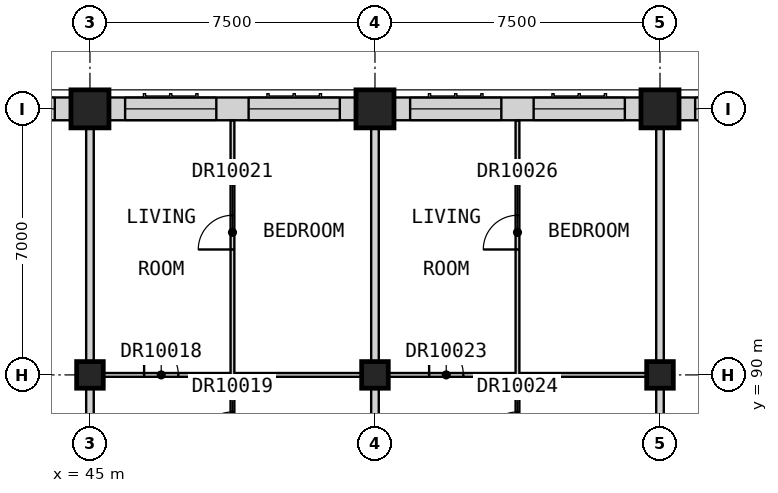
"""IFC4 building model, lengths in metres.
Left out: names, types, materials, properties, quantities, classifications, styles, units other than length and angle.
Written with IfcOpenShell. Run it as: python <this file> out.ifc"""

import sys

from ifc_helpers import new_model, si_unit, direction, frame, frame_2d, origin, origin_2d, place, context, subcontext, project, spatial, rectangle, extrude, element, fill, save


model = new_model("IFC4")
c1 = context("Model", 3, precision=1e-05, world=origin(), true_north=direction((0.0, 1.0)))
c2 = subcontext(c1, "Body", "Model", "MODEL_VIEW")
j1 = project(units=[si_unit("LENGTHUNIT", "METRE"), si_unit("PLANEANGLEUNIT", "RADIAN")], contexts=[c1])
p1 = place(None, origin())
s1 = spatial("IfcSite", under=j1, at=p1, CompositionType="ELEMENT")
p2 = place(p1, origin())
s2 = spatial("IfcBuilding", under=s1, at=p2, CompositionType="ELEMENT")
p3 = place(p2, frame((0.0, 0.0, 273.2)))
s3 = spatial("IfcBuildingStorey", under=s2, at=p3, CompositionType="ELEMENT", Elevation=273.2)
p4 = place(p3, frame((45.0, 90.0, 0.0), z_axis=(0.0, 0.0, 1.0), x_axis=(1.0, 0.0, 0.0)))
e1 = element("IfcColumn", 1, at=p4, inside=s3, PredefinedType="COLUMN", context=c2, shape_type="SweptSolid", body=[
    extrude(rectangle(XDim=0.7, YDim=0.7, at=origin_2d()), origin(), (0.0, 0.0, 1.0), 3.5),
])
p5 = place(p3, frame((45.0, 97.0, 0.0), z_axis=(0.0, 0.0, 1.0), x_axis=(1.0, 0.0, 0.0)))
e2 = element("IfcColumn", 2, at=p5, inside=s3, PredefinedType="COLUMN", context=c2, shape_type="SweptSolid", body=[
    extrude(rectangle(XDim=1.0, YDim=1.0, at=origin_2d()), origin(), (0.0, 0.0, 1.0), 3.5),
])
p6 = place(p3, frame((52.5, 90.0, 0.0), z_axis=(0.0, 0.0, 1.0), x_axis=(1.0, 0.0, 0.0)))
e3 = element("IfcColumn", 3, at=p6, inside=s3, PredefinedType="COLUMN", context=c2, shape_type="SweptSolid", body=[
    extrude(rectangle(XDim=0.7, YDim=0.7, at=origin_2d()), origin(), (0.0, 0.0, 1.0), 3.5),
])
p7 = place(p3, frame((52.5, 97.0, 0.0), z_axis=(0.0, 0.0, 1.0), x_axis=(1.0, 0.0, 0.0)))
e4 = element("IfcColumn", 4, at=p7, inside=s3, PredefinedType="COLUMN", context=c2, shape_type="SweptSolid", body=[
    extrude(rectangle(XDim=1.0, YDim=1.0, at=origin_2d()), origin(), (0.0, 0.0, 1.0), 3.5),
])
p8 = place(p3, frame((60.0, 90.0, 0.0), z_axis=(0.0, 0.0, 1.0), x_axis=(1.0, 0.0, 0.0)))
e5 = element("IfcColumn", 5, at=p8, inside=s3, PredefinedType="COLUMN", context=c2, shape_type="SweptSolid", body=[
    extrude(rectangle(XDim=0.7, YDim=0.7, at=origin_2d()), origin(), (0.0, 0.0, 1.0), 3.5),
])
p9 = place(p3, frame((60.0, 97.0, 0.0), z_axis=(0.0, 0.0, 1.0), x_axis=(1.0, 0.0, 0.0)))
e6 = element("IfcColumn", 6, at=p9, inside=s3, PredefinedType="COLUMN", context=c2, shape_type="SweptSolid", body=[
    extrude(rectangle(XDim=1.0, YDim=1.0, at=origin_2d()), origin(), (0.0, 0.0, 1.0), 3.5),
])
p10 = place(p3, frame((67.0, 97.0, 0.0), z_axis=(0.0, 0.0, 1.0), x_axis=(-1.0, 0.0, 0.0)))
e7 = element("IfcWall", 7, at=p10, inside=s3, PredefinedType="SOLIDWALL", context=c2, shape_type="SweptSolid", body=[
    extrude(rectangle(XDim=6.5, YDim=0.6, at=frame_2d((3.25, 0.0))), origin(), (0.0, 0.0, 1.0), 2.75),
])
p11 = place(p10, frame((3.675, 0.0, 0.8)))
e8 = element("IfcOpeningElement", 8, at=p11, cuts=e7, PredefinedType="OPENING", context=c2, shape_type="SweptSolid", body=[
    extrude(rectangle(XDim=2.4, YDim=1.8, at=frame_2d((1.2, 0.9))), frame((0.0, 0.31, 0.0), z_axis=(0.0, -1.0, 0.0), x_axis=(1.0, 0.0, 0.0)), (0.0, 0.0, 1.0), 0.62),
])
p12 = place(p10, frame((0.425, 0.0, 0.8)))
e9 = element("IfcOpeningElement", 9, at=p12, cuts=e7, PredefinedType="OPENING", context=c2, shape_type="SweptSolid", body=[
    extrude(rectangle(XDim=2.4, YDim=1.8, at=frame_2d((1.2, 0.9))), frame((0.0, 0.31, 0.0), z_axis=(0.0, -1.0, 0.0), x_axis=(1.0, 0.0, 0.0)), (0.0, 0.0, 1.0), 0.62),
])
p13 = place(p3, frame((59.5, 97.0, 0.0), z_axis=(0.0, 0.0, 1.0), x_axis=(-1.0, 0.0, 0.0)))
e10 = element("IfcWall", 10, at=p13, inside=s3, PredefinedType="SOLIDWALL", context=c2, shape_type="SweptSolid", body=[
    extrude(rectangle(XDim=6.5, YDim=0.6, at=frame_2d((3.25, 0.0))), origin(), (0.0, 0.0, 1.0), 2.75),
])
p14 = place(p13, frame((3.675, 0.0, 0.8)))
e11 = element("IfcOpeningElement", 11, at=p14, cuts=e10, PredefinedType="OPENING", context=c2, shape_type="SweptSolid", body=[
    extrude(rectangle(XDim=2.4, YDim=1.8, at=frame_2d((1.2, 0.9))), frame((0.0, 0.31, 0.0), z_axis=(0.0, -1.0, 0.0), x_axis=(1.0, 0.0, 0.0)), (0.0, 0.0, 1.0), 0.62),
])
p15 = place(p13, frame((0.425, 0.0, 0.8)))
e12 = element("IfcOpeningElement", 12, at=p15, cuts=e10, PredefinedType="OPENING", context=c2, shape_type="SweptSolid", body=[
    extrude(rectangle(XDim=2.4, YDim=1.8, at=frame_2d((1.2, 0.9))), frame((0.0, 0.31, 0.0), z_axis=(0.0, -1.0, 0.0), x_axis=(1.0, 0.0, 0.0)), (0.0, 0.0, 1.0), 0.62),
])
p16 = place(p3, frame((52.0, 97.0, 0.0), z_axis=(0.0, 0.0, 1.0), x_axis=(-1.0, 0.0, 0.0)))
e13 = element("IfcWall", 13, at=p16, inside=s3, PredefinedType="SOLIDWALL", context=c2, shape_type="SweptSolid", body=[
    extrude(rectangle(XDim=6.5, YDim=0.6, at=frame_2d((3.25, 0.0))), origin(), (0.0, 0.0, 1.0), 2.75),
])
p17 = place(p16, frame((3.675, 0.0, 0.8)))
e14 = element("IfcOpeningElement", 14, at=p17, cuts=e13, PredefinedType="OPENING", context=c2, shape_type="SweptSolid", body=[
    extrude(rectangle(XDim=2.4, YDim=1.8, at=frame_2d((1.2, 0.9))), frame((0.0, 0.31, 0.0), z_axis=(0.0, -1.0, 0.0), x_axis=(1.0, 0.0, 0.0)), (0.0, 0.0, 1.0), 0.62),
])
p18 = place(p16, frame((0.425, 0.0, 0.8)))
e15 = element("IfcOpeningElement", 15, at=p18, cuts=e13, PredefinedType="OPENING", context=c2, shape_type="SweptSolid", body=[
    extrude(rectangle(XDim=2.4, YDim=1.8, at=frame_2d((1.2, 0.9))), frame((0.0, 0.31, 0.0), z_axis=(0.0, -1.0, 0.0), x_axis=(1.0, 0.0, 0.0)), (0.0, 0.0, 1.0), 0.62),
])
p19 = place(p3, frame((44.5, 97.0, 0.0), z_axis=(0.0, 0.0, 1.0), x_axis=(-1.0, 0.0, 0.0)))
e16 = element("IfcWall", 16, at=p19, inside=s3, PredefinedType="SOLIDWALL", context=c2, shape_type="SweptSolid", body=[
    extrude(rectangle(XDim=6.5, YDim=0.6, at=frame_2d((3.25, 0.0))), origin(), (0.0, 0.0, 1.0), 2.75),
])
p20 = place(p19, frame((3.675, 0.0, 0.8)))
e17 = element("IfcOpeningElement", 17, at=p20, cuts=e16, PredefinedType="OPENING", context=c2, shape_type="SweptSolid", body=[
    extrude(rectangle(XDim=2.4, YDim=1.8, at=frame_2d((1.2, 0.9))), frame((0.0, 0.31, 0.0), z_axis=(0.0, -1.0, 0.0), x_axis=(1.0, 0.0, 0.0)), (0.0, 0.0, 1.0), 0.62),
])
p21 = place(p19, frame((0.425, 0.0, 0.8)))
e18 = element("IfcOpeningElement", 18, at=p21, cuts=e16, PredefinedType="OPENING", context=c2, shape_type="SweptSolid", body=[
    extrude(rectangle(XDim=2.4, YDim=1.8, at=frame_2d((1.2, 0.9))), frame((0.0, 0.31, 0.0), z_axis=(0.0, -1.0, 0.0), x_axis=(1.0, 0.0, 0.0)), (0.0, 0.0, 1.0), 0.62),
])
for number, where, z_axis, x_axis in (
    (19, (45.0, 84.375, 0.0), (0.0, 0.0, 1.0), (0.0, 1.0, 0.0)),
    (20, (52.5, 84.375, 0.0), (0.0, 0.0, 1.0), (0.0, 1.0, 0.0)),
    (21, (60.0, 84.375, 0.0), (0.0, 0.0, 1.0), (0.0, 1.0, 0.0)),
):
    element("IfcWall", number, at=place(p3, frame(where, z_axis=z_axis, x_axis=x_axis)), inside=s3, PredefinedType="PARTITIONING", context=c2, shape_type="SweptSolid", body=[
        extrude(rectangle(XDim=13.125, YDim=0.2, at=frame_2d((6.562, 0.0))), origin(), (0.0, 0.0, 1.0), 3.25),
    ])
p22 = place(p3, frame((45.1, 90.0, 0.0), z_axis=(0.0, 0.0, 1.0), x_axis=(1.0, 0.0, 0.0)))
e22 = element("IfcWall", 22, at=p22, inside=s3, PredefinedType="PARTITIONING", context=c2, shape_type="SweptSolid", body=[
    extrude(rectangle(XDim=14.8, YDim=0.1, at=frame_2d((7.4, 0.0))), origin(), (0.0, 0.0, 1.0), 3.25),
])
p23 = place(p22, frame((1.325, 0.0, 0.0)))
e23 = element("IfcOpeningElement", 23, at=p23, cuts=e22, PredefinedType="OPENING", context=c2, shape_type="SweptSolid", body=[
    extrude(rectangle(XDim=0.9, YDim=2.1, at=frame_2d((0.45, 1.05))), frame((0.0, 0.06, 0.0), z_axis=(0.0, -1.0, 0.0), x_axis=(1.0, 0.0, 0.0)), (0.0, 0.0, 1.0), 0.12),
])
p24 = place(p22, frame((8.825, 0.0, 0.0)))
e24 = element("IfcOpeningElement", 24, at=p24, cuts=e22, PredefinedType="OPENING", context=c2, shape_type="SweptSolid", body=[
    extrude(rectangle(XDim=0.9, YDim=2.1, at=frame_2d((0.45, 1.05))), frame((0.0, 0.06, 0.0), z_axis=(0.0, -1.0, 0.0), x_axis=(1.0, 0.0, 0.0)), (0.0, 0.0, 1.0), 0.12),
])
p25 = place(p3, frame((48.75, 87.212, 0.0), z_axis=(0.0, 0.0, 1.0), x_axis=(0.0, 1.0, 0.0)))
e25 = element("IfcWall", 25, at=p25, inside=s3, PredefinedType="PARTITIONING", context=c2, shape_type="SweptSolid", body=[
    extrude(rectangle(XDim=9.478, YDim=0.1, at=frame_2d((4.739, 0.0))), origin(), (0.0, 0.0, 1.0), 3.25),
])
p26 = place(p25, frame((0.913, 0.0, 0.0)))
e26 = element("IfcOpeningElement", 26, at=p26, cuts=e25, PredefinedType="OPENING", context=c2, shape_type="SweptSolid", body=[
    extrude(rectangle(XDim=0.9, YDim=2.1, at=frame_2d((0.45, 1.05))), frame((0.0, 0.06, 0.0), z_axis=(0.0, -1.0, 0.0), x_axis=(1.0, 0.0, 0.0)), (0.0, 0.0, 1.0), 0.12),
])
p27 = place(p25, frame((6.087, 0.0, 0.0)))
e27 = element("IfcOpeningElement", 27, at=p27, cuts=e25, PredefinedType="OPENING", context=c2, shape_type="SweptSolid", body=[
    extrude(rectangle(XDim=0.9, YDim=2.1, at=frame_2d((0.45, 1.05))), frame((0.0, 0.06, 0.0), z_axis=(0.0, -1.0, 0.0), x_axis=(1.0, 0.0, 0.0)), (0.0, 0.0, 1.0), 0.12),
])
p28 = place(p3, frame((56.25, 87.212, 0.0), z_axis=(0.0, 0.0, 1.0), x_axis=(0.0, 1.0, 0.0)))
e28 = element("IfcWall", 28, at=p28, inside=s3, PredefinedType="PARTITIONING", context=c2, shape_type="SweptSolid", body=[
    extrude(rectangle(XDim=9.478, YDim=0.1, at=frame_2d((4.739, 0.0))), origin(), (0.0, 0.0, 1.0), 3.25),
])
p29 = place(p28, frame((0.913, 0.0, 0.0)))
e29 = element("IfcOpeningElement", 29, at=p29, cuts=e28, PredefinedType="OPENING", context=c2, shape_type="SweptSolid", body=[
    extrude(rectangle(XDim=0.9, YDim=2.1, at=frame_2d((0.45, 1.05))), frame((0.0, 0.06, 0.0), z_axis=(0.0, -1.0, 0.0), x_axis=(1.0, 0.0, 0.0)), (0.0, 0.0, 1.0), 0.12),
])
p30 = place(p28, frame((6.087, 0.0, 0.0)))
e30 = element("IfcOpeningElement", 30, at=p30, cuts=e28, PredefinedType="OPENING", context=c2, shape_type="SweptSolid", body=[
    extrude(rectangle(XDim=0.9, YDim=2.1, at=frame_2d((0.45, 1.05))), frame((0.0, 0.06, 0.0), z_axis=(0.0, -1.0, 0.0), x_axis=(1.0, 0.0, 0.0)), (0.0, 0.0, 1.0), 0.12),
])
p31 = place(p11, origin())
e31 = element("IfcWindow", 31, at=p31, inside=s3, PartitioningType="SINGLE_PANEL", PredefinedType="WINDOW", context=c2, shape_type="SweptSolid", body=[
    extrude(rectangle(XDim=2.4, YDim=1.8, at=frame_2d((1.2, 0.9))), frame((0.0, -0.07, 0.0), z_axis=(0.0, -1.0, 0.0), x_axis=(1.0, 0.0, 0.0)), (0.0, 0.0, 1.0), 0.06),
])
fill(e8, e31)
p32 = place(p14, origin())
e32 = element("IfcWindow", 32, at=p32, inside=s3, PartitioningType="SINGLE_PANEL", PredefinedType="WINDOW", context=c2, shape_type="SweptSolid", body=[
    extrude(rectangle(XDim=2.4, YDim=1.8, at=frame_2d((1.2, 0.9))), frame((0.0, -0.07, 0.0), z_axis=(0.0, -1.0, 0.0), x_axis=(1.0, 0.0, 0.0)), (0.0, 0.0, 1.0), 0.06),
])
fill(e11, e32)
p33 = place(p15, origin())
e33 = element("IfcWindow", 33, at=p33, inside=s3, PartitioningType="SINGLE_PANEL", PredefinedType="WINDOW", context=c2, shape_type="SweptSolid", body=[
    extrude(rectangle(XDim=2.4, YDim=1.8, at=frame_2d((1.2, 0.9))), frame((0.0, -0.07, 0.0), z_axis=(0.0, -1.0, 0.0), x_axis=(1.0, 0.0, 0.0)), (0.0, 0.0, 1.0), 0.06),
])
fill(e12, e33)
p34 = place(p17, origin())
e34 = element("IfcWindow", 34, at=p34, inside=s3, PartitioningType="SINGLE_PANEL", PredefinedType="WINDOW", context=c2, shape_type="SweptSolid", body=[
    extrude(rectangle(XDim=2.4, YDim=1.8, at=frame_2d((1.2, 0.9))), frame((0.0, -0.07, 0.0), z_axis=(0.0, -1.0, 0.0), x_axis=(1.0, 0.0, 0.0)), (0.0, 0.0, 1.0), 0.06),
])
fill(e14, e34)
p35 = place(p18, origin())
e35 = element("IfcWindow", 35, at=p35, inside=s3, PartitioningType="SINGLE_PANEL", PredefinedType="WINDOW", context=c2, shape_type="SweptSolid", body=[
    extrude(rectangle(XDim=2.4, YDim=1.8, at=frame_2d((1.2, 0.9))), frame((0.0, -0.07, 0.0), z_axis=(0.0, -1.0, 0.0), x_axis=(1.0, 0.0, 0.0)), (0.0, 0.0, 1.0), 0.06),
])
fill(e15, e35)
p36 = place(p21, origin())
e36 = element("IfcWindow", 36, at=p36, inside=s3, PartitioningType="SINGLE_PANEL", PredefinedType="WINDOW", context=c2, shape_type="SweptSolid", body=[
    extrude(rectangle(XDim=2.4, YDim=1.8, at=frame_2d((1.2, 0.9))), frame((0.0, -0.07, 0.0), z_axis=(0.0, -1.0, 0.0), x_axis=(1.0, 0.0, 0.0)), (0.0, 0.0, 1.0), 0.06),
])
fill(e18, e36)
p37 = place(p23, origin())
e37 = element("IfcDoor", 37, at=p37, inside=s3, OperationType="SINGLE_SWING_RIGHT", PredefinedType="DOOR", context=c2, shape_type="SweptSolid", body=[
    extrude(rectangle(XDim=0.9, YDim=2.1, at=frame_2d((0.45, 1.05))), frame((0.0, 0.025, 0.0), z_axis=(0.0, -1.0, 0.0), x_axis=(1.0, 0.0, 0.0)), (0.0, 0.0, 1.0), 0.05),
])
fill(e23, e37)
p38 = place(p26, origin())
e38 = element("IfcDoor", 38, at=p38, inside=s3, OperationType="SINGLE_SWING_LEFT", PredefinedType="DOOR", context=c2, shape_type="SweptSolid", body=[
    extrude(rectangle(XDim=0.9, YDim=2.1, at=frame_2d((0.45, 1.05))), frame((0.0, 0.025, 0.0), z_axis=(0.0, -1.0, 0.0), x_axis=(1.0, 0.0, 0.0)), (0.0, 0.0, 1.0), 0.05),
])
fill(e26, e38)
p39 = place(p27, origin())
e39 = element("IfcDoor", 39, at=p39, inside=s3, OperationType="SINGLE_SWING_LEFT", PredefinedType="DOOR", context=c2, shape_type="SweptSolid", body=[
    extrude(rectangle(XDim=0.9, YDim=2.1, at=frame_2d((0.45, 1.05))), frame((0.0, 0.025, 0.0), z_axis=(0.0, -1.0, 0.0), x_axis=(1.0, 0.0, 0.0)), (0.0, 0.0, 1.0), 0.05),
])
fill(e27, e39)
p40 = place(p24, origin())
e40 = element("IfcDoor", 40, at=p40, inside=s3, OperationType="SINGLE_SWING_RIGHT", PredefinedType="DOOR", context=c2, shape_type="SweptSolid", body=[
    extrude(rectangle(XDim=0.9, YDim=2.1, at=frame_2d((0.45, 1.05))), frame((0.0, 0.025, 0.0), z_axis=(0.0, -1.0, 0.0), x_axis=(1.0, 0.0, 0.0)), (0.0, 0.0, 1.0), 0.05),
])
fill(e24, e40)
p41 = place(p29, origin())
e41 = element("IfcDoor", 41, at=p41, inside=s3, OperationType="SINGLE_SWING_LEFT", PredefinedType="DOOR", context=c2, shape_type="SweptSolid", body=[
    extrude(rectangle(XDim=0.9, YDim=2.1, at=frame_2d((0.45, 1.05))), frame((0.0, 0.025, 0.0), z_axis=(0.0, -1.0, 0.0), x_axis=(1.0, 0.0, 0.0)), (0.0, 0.0, 1.0), 0.05),
])
fill(e29, e41)
p42 = place(p30, origin())
e42 = element("IfcDoor", 42, at=p42, inside=s3, OperationType="SINGLE_SWING_LEFT", PredefinedType="DOOR", context=c2, shape_type="SweptSolid", body=[
    extrude(rectangle(XDim=0.9, YDim=2.1, at=frame_2d((0.45, 1.05))), frame((0.0, 0.025, 0.0), z_axis=(0.0, -1.0, 0.0), x_axis=(1.0, 0.0, 0.0)), (0.0, 0.0, 1.0), 0.05),
])
fill(e30, e42)
save(model, sys.argv[1])
